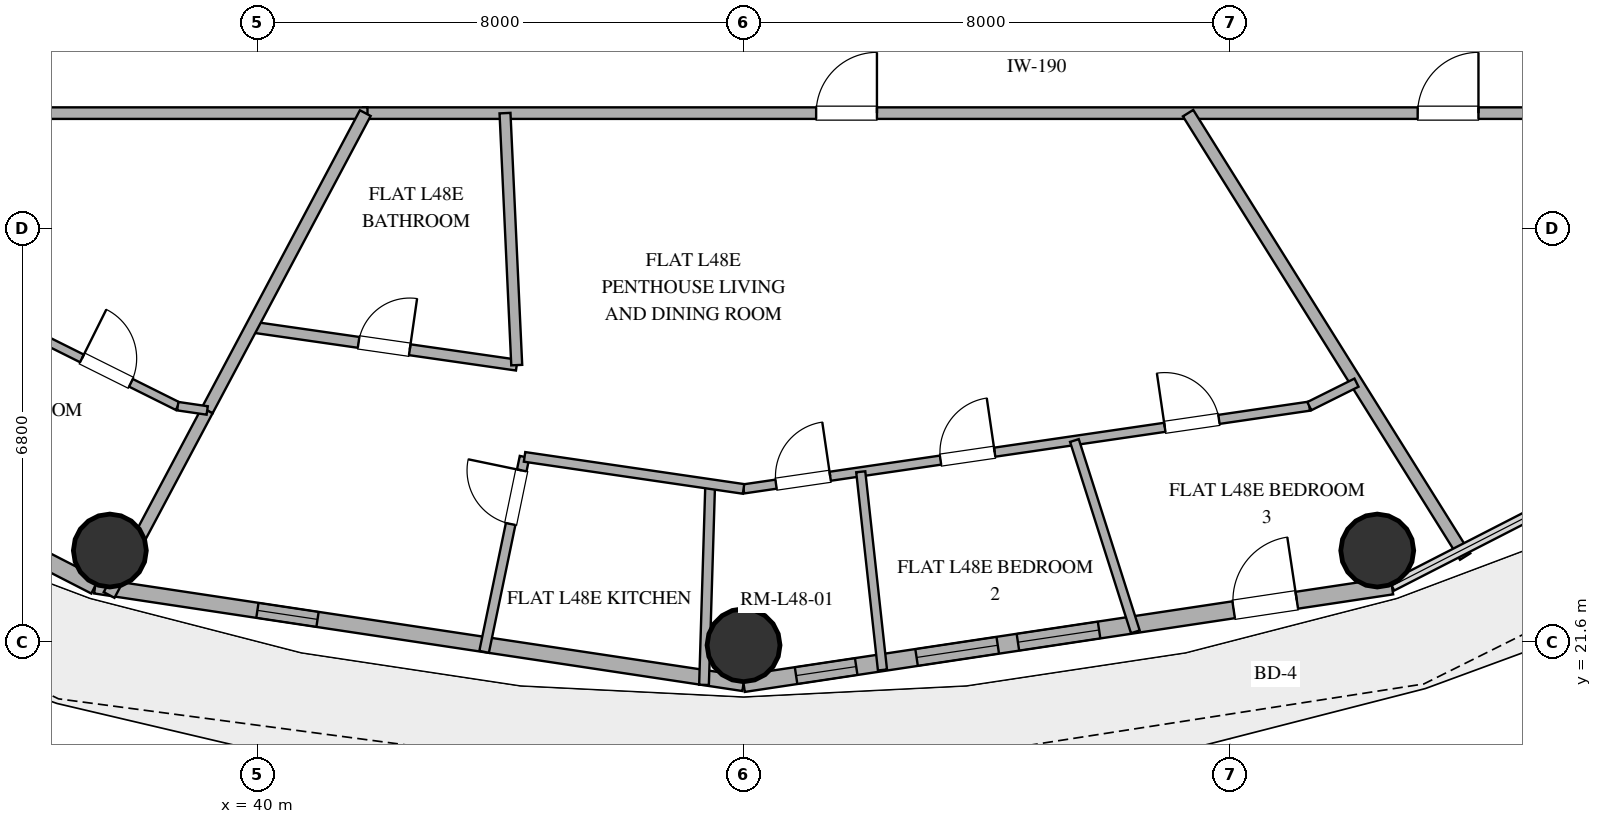
"""IFC4 building model, lengths in metres.
Left out: names, types, materials, properties, quantities, classifications, styles, units other than length and angle.
Written with IfcOpenShell. Run it as: python <this file> out.ifc"""

import sys

from ifc_helpers import new_model, si_unit, direction, frame, frame_2d, origin, origin_2d, place, context, subcontext, project, spatial, rectangle, hollow_circle, extrude, element, fill, save


model = new_model("IFC4")
c1 = context("Model", 3, precision=1e-05, world=origin(), true_north=direction((0.0, 1.0)))
c2 = subcontext(c1, "Body", "Model", "MODEL_VIEW")
j1 = project(units=[si_unit("LENGTHUNIT", "METRE"), si_unit("PLANEANGLEUNIT", "RADIAN")], contexts=[c1])
p1 = place(None, origin())
s1 = spatial("IfcSite", under=j1, at=p1, CompositionType="ELEMENT")
p2 = place(p1, origin())
s2 = spatial("IfcBuilding", under=s1, at=p2, CompositionType="ELEMENT")
p3 = place(p2, frame((0.0, 0.0, 190.2)))
s3 = spatial("IfcBuildingStorey", under=s2, at=p3, CompositionType="ELEMENT", Elevation=190.2)
for number, where, z_axis, x_axis in (
    (1, (37.578, 23.107, 0.0), (0.0, 0.0, 1.0), (1.0, 0.0, 0.0)),
    (2, (48.0, 21.55, 0.0), (0.0, 0.0, 1.0), (1.0, 0.0, 0.0)),
    (3, (58.422, 23.107, 0.0), (0.0, 0.0, 1.0), (1.0, 0.0, 0.0)),
):
    element("IfcColumn", number, at=place(p3, frame(where, z_axis=z_axis, x_axis=x_axis)), inside=s3, PredefinedType="COLUMN", context=c2, shape_type="SweptSolid", body=[
        extrude(hollow_circle(Radius=0.6, WallThickness=0.032, at=origin_2d()), origin(), (0.0, 0.0, 1.0), 3.38),
    ])
p4 = place(p3, frame((28.424, 27.094, 0.0), z_axis=(0.0, 0.0, 1.0), x_axis=(0.889872523182, -0.456209263919, 0.0)))
e4 = element("IfcWall", 4, at=p4, inside=s3, PredefinedType="SOLIDWALL", context=c2, shape_type="SweptSolid", body=[
    extrude(rectangle(XDim=10.016, YDim=0.28, at=frame_2d((5.008, 0.0))), origin(), (0.0, 0.0, 1.0), 3.38),
])
p5 = place(p4, frame((1.85, 0.0, 0.85)))
e5 = element("IfcOpeningElement", 5, at=p5, cuts=e4, PredefinedType="OPENING", context=c2, shape_type="SweptSolid", body=[
    extrude(rectangle(XDim=1.5, YDim=2.0, at=frame_2d((0.75, 1.0))), frame((0.0, 0.15, 0.0), z_axis=(0.0, -1.0, 0.0), x_axis=(1.0, 0.0, 0.0)), (0.0, 0.0, 1.0), 0.3),
])
p6 = place(p4, frame((4.595, 0.0, 0.85)))
e6 = element("IfcOpeningElement", 6, at=p6, cuts=e4, PredefinedType="OPENING", context=c2, shape_type="SweptSolid", body=[
    extrude(rectangle(XDim=1.5, YDim=1.8, at=frame_2d((0.75, 0.9))), frame((0.0, 0.15, 0.0), z_axis=(0.0, -1.0, 0.0), x_axis=(1.0, 0.0, 0.0)), (0.0, 0.0, 1.0), 0.3),
])
p7 = place(p4, frame((6.58, 0.0, 0.85)))
e7 = element("IfcOpeningElement", 7, at=p7, cuts=e4, PredefinedType="OPENING", context=c2, shape_type="SweptSolid", body=[
    extrude(rectangle(XDim=1.5, YDim=1.8, at=frame_2d((0.75, 0.9))), frame((0.0, 0.15, 0.0), z_axis=(0.0, -1.0, 0.0), x_axis=(1.0, 0.0, 0.0)), (0.0, 0.0, 1.0), 0.3),
])
p8 = place(p3, frame((37.337, 22.525, 0.0), z_axis=(0.0, 0.0, 1.0), x_axis=(0.988863993413, -0.148822049884, 0.0)))
e8 = element("IfcWall", 8, at=p8, inside=s3, PredefinedType="SOLIDWALL", context=c2, shape_type="SweptSolid", body=[
    extrude(rectangle(XDim=10.783, YDim=0.25, at=frame_2d((5.392, 0.0))), origin(), (0.0, 0.0, 1.0), 3.38),
])
p9 = place(p8, frame((2.698, 0.0, 1.42)))
e9 = element("IfcOpeningElement", 9, at=p9, cuts=e8, PredefinedType="OPENING", context=c2, shape_type="SweptSolid", body=[
    extrude(rectangle(XDim=1.0, YDim=1.05, at=frame_2d((0.5, 0.525))), frame((0.0, 0.135, 0.0), z_axis=(0.0, -1.0, 0.0), x_axis=(1.0, 0.0, 0.0)), (0.0, 0.0, 1.0), 0.27),
])
p10 = place(p3, frame((48.0, 20.92, 0.0), z_axis=(0.0, 0.0, 1.0), x_axis=(0.988863993413, 0.148822049884, 0.0)))
e10 = element("IfcWall", 10, at=p10, inside=s3, PredefinedType="SOLIDWALL", context=c2, shape_type="SweptSolid", body=[
    extrude(rectangle(XDim=10.783, YDim=0.28, at=frame_2d((5.392, 0.0))), origin(), (0.0, 0.0, 1.0), 3.38),
])
p11 = place(p10, frame((2.878, 0.0, 0.85)))
e11 = element("IfcOpeningElement", 11, at=p11, cuts=e10, PredefinedType="OPENING", context=c2, shape_type="SweptSolid", body=[
    extrude(rectangle(XDim=1.35, YDim=1.8, at=frame_2d((0.675, 0.9))), frame((0.0, 0.15, 0.0), z_axis=(0.0, -1.0, 0.0), x_axis=(1.0, 0.0, 0.0)), (0.0, 0.0, 1.0), 0.3),
])
p12 = place(p10, frame((4.563, 0.0, 0.85)))
e12 = element("IfcOpeningElement", 12, at=p12, cuts=e10, PredefinedType="OPENING", context=c2, shape_type="SweptSolid", body=[
    extrude(rectangle(XDim=1.35, YDim=1.8, at=frame_2d((0.675, 0.9))), frame((0.0, 0.15, 0.0), z_axis=(0.0, -1.0, 0.0), x_axis=(1.0, 0.0, 0.0)), (0.0, 0.0, 1.0), 0.3),
])
p13 = place(p10, frame((8.151, 0.0, 0.0)))
e13 = element("IfcOpeningElement", 13, at=p13, cuts=e10, PredefinedType="OPENING", context=c2, shape_type="SweptSolid", body=[
    extrude(rectangle(XDim=1.05, YDim=2.2, at=frame_2d((0.525, 1.1))), frame((0.0, 0.15, 0.0), z_axis=(0.0, -1.0, 0.0), x_axis=(1.0, 0.0, 0.0)), (0.0, 0.0, 1.0), 0.3),
])
p14 = place(p10, frame((0.874, 0.0, 0.85)))
e14 = element("IfcOpeningElement", 14, at=p14, cuts=e10, PredefinedType="OPENING", context=c2, shape_type="SweptSolid", body=[
    extrude(rectangle(XDim=1.0, YDim=1.8, at=frame_2d((0.5, 0.9))), frame((0.0, 0.15, 0.0), z_axis=(0.0, -1.0, 0.0), x_axis=(1.0, 0.0, 0.0)), (0.0, 0.0, 1.0), 0.3),
])
p15 = place(p3, frame((41.743, 30.3, 0.0), z_axis=(0.0, 0.0, 1.0), x_axis=(1.0, 0.0, 0.0)))
e15 = element("IfcWall", 15, at=p15, inside=s3, PredefinedType="PARTITIONING", context=c2, shape_type="SweptSolid", body=[
    extrude(rectangle(XDim=22.157, YDim=0.19, at=frame_2d((11.079, 0.0))), origin(), (0.0, 0.0, 1.0), 2.74),
])
p16 = place(p15, frame((7.451, 0.0, 0.0)))
e16 = element("IfcOpeningElement", 16, at=p16, cuts=e15, PredefinedType="OPENING", context=c2, shape_type="SweptSolid", body=[
    extrude(rectangle(XDim=1.0, YDim=2.2, at=frame_2d((0.5, 1.1))), frame((0.0, 0.105, 0.0), z_axis=(0.0, -1.0, 0.0), x_axis=(1.0, 0.0, 0.0)), (0.0, 0.0, 1.0), 0.21),
])
p17 = place(p15, frame((17.344, 0.0, 0.0)))
e17 = element("IfcOpeningElement", 17, at=p17, cuts=e15, PredefinedType="OPENING", context=c2, shape_type="SweptSolid", body=[
    extrude(rectangle(XDim=1.0, YDim=2.2, at=frame_2d((0.5, 1.1))), frame((0.0, 0.105, 0.0), z_axis=(0.0, -1.0, 0.0), x_axis=(1.0, 0.0, 0.0)), (0.0, 0.0, 1.0), 0.21),
])
p18 = place(p3, frame((41.815, 30.3, 0.0), z_axis=(0.0, 0.0, 1.0), x_axis=(-1.0, 0.0, 0.0)))
e18 = element("IfcWall", 18, at=p18, inside=s3, PredefinedType="PARTITIONING", context=c2, shape_type="SweptSolid", body=[
    extrude(rectangle(XDim=9.715, YDim=0.19, at=frame_2d((4.857, 0.0))), origin(), (0.0, 0.0, 1.0), 2.74),
])
p19 = place(p3, frame((59.868, 23.008, 0.0), z_axis=(0.0, 0.0, 1.0), x_axis=(-0.529914717401, 0.848050937315, 0.0)))
e19 = element("IfcWall", 19, at=p19, inside=s3, PredefinedType="PARTITIONING", context=c2, shape_type="SweptSolid", body=[
    extrude(rectangle(XDim=8.599, YDim=0.2, at=frame_2d((4.299, 0.0))), origin(), (0.0, 0.0, 1.0), 2.74),
])
p20 = place(p3, frame((39.909, 26.783, 0.0), z_axis=(0.0, 0.0, 1.0), x_axis=(0.989831677838, -0.142243627443, 0.0)))
e20 = element("IfcWall", 20, at=p20, inside=s3, PredefinedType="PLUMBINGWALL", context=c2, shape_type="SweptSolid", body=[
    extrude(rectangle(XDim=4.406, YDim=0.18, at=frame_2d((2.203, 0.0))), origin(), (0.0, 0.0, 1.0), 2.74),
])
p21 = place(p20, frame((1.778, 0.0, 0.0)))
e21 = element("IfcOpeningElement", 21, at=p21, cuts=e20, PredefinedType="OPENING", context=c2, shape_type="SweptSolid", body=[
    extrude(rectangle(XDim=0.85, YDim=2.1, at=frame_2d((0.425, 1.05))), frame((0.0, 0.1, 0.0), z_axis=(0.0, -1.0, 0.0), x_axis=(1.0, 0.0, 0.0)), (0.0, 0.0, 1.0), 0.2),
])
p22 = place(p3, frame((44.27, 26.156, 0.0), z_axis=(0.0, 0.0, 1.0), x_axis=(-0.046552902745, 0.998915825906, 0.0)))
e22 = element("IfcWall", 22, at=p22, inside=s3, PredefinedType="PLUMBINGWALL", context=c2, shape_type="SweptSolid", body=[
    extrude(rectangle(XDim=4.148, YDim=0.18, at=frame_2d((2.074, 0.0))), origin(), (0.0, 0.0, 1.0), 2.74),
])
p23 = place(p3, frame((39.179, 25.41, 0.0), z_axis=(0.0, 0.0, 1.0), x_axis=(0.469450659963, 0.88295870677, 0.0)))
e23 = element("IfcWall", 23, at=p23, inside=s3, PredefinedType="PARTITIONING", context=c2, shape_type="SweptSolid", body=[
    extrude(rectangle(XDim=5.538, YDim=0.2, at=frame_2d((2.769, 0.0))), origin(), (0.0, 0.0, 1.0), 2.74),
])
p24 = place(p3, frame((48.0, 24.12, 0.0), z_axis=(0.0, 0.0, 1.0), x_axis=(0.989474667704, 0.144706191892, 0.0)))
e24 = element("IfcWall", 24, at=p24, inside=s3, PredefinedType="PARTITIONING", context=c2, shape_type="SweptSolid", body=[
    extrude(rectangle(XDim=9.404, YDim=0.15, at=frame_2d((4.702, 0.0))), origin(), (0.0, 0.0, 1.0), 2.74),
])
p25 = place(p24, frame((7.002, 0.0, 0.0)))
e25 = element("IfcOpeningElement", 25, at=p25, cuts=e24, PredefinedType="OPENING", context=c2, shape_type="SweptSolid", body=[
    extrude(rectangle(XDim=0.9, YDim=2.1, at=frame_2d((0.45, 1.05))), frame((0.0, 0.085, 0.0), z_axis=(0.0, -1.0, 0.0), x_axis=(1.0, 0.0, 0.0)), (0.0, 0.0, 1.0), 0.17),
])
p26 = place(p24, frame((3.274, 0.0, 0.0)))
e26 = element("IfcOpeningElement", 26, at=p26, cuts=e24, PredefinedType="OPENING", context=c2, shape_type="SweptSolid", body=[
    extrude(rectangle(XDim=0.9, YDim=2.1, at=frame_2d((0.45, 1.05))), frame((0.0, 0.085, 0.0), z_axis=(0.0, -1.0, 0.0), x_axis=(1.0, 0.0, 0.0)), (0.0, 0.0, 1.0), 0.17),
])
p27 = place(p24, frame((0.54, 0.0, 0.0)))
e27 = element("IfcOpeningElement", 27, at=p27, cuts=e24, PredefinedType="OPENING", context=c2, shape_type="SweptSolid", body=[
    extrude(rectangle(XDim=0.9, YDim=2.1, at=frame_2d((0.45, 1.05))), frame((0.0, 0.085, 0.0), z_axis=(0.0, -1.0, 0.0), x_axis=(1.0, 0.0, 0.0)), (0.0, 0.0, 1.0), 0.17),
])
p28 = place(p3, frame((39.179, 25.41, 0.0), z_axis=(0.0, 0.0, 1.0), x_axis=(-0.469492799927, -0.882936300543, 0.0)))
e28 = element("IfcWall", 28, at=p28, inside=s3, PredefinedType="PARTITIONING", context=c2, shape_type="SweptSolid", body=[
    extrude(rectangle(XDim=3.437, YDim=0.2, at=frame_2d((1.718, 0.0))), origin(), (0.0, 0.0, 1.0), 2.74),
])
p29 = place(p3, frame((47.451, 24.2, 0.0), z_axis=(0.0, 0.0, 1.0), x_axis=(-0.03081032148, -0.999525249351, 0.0)))
e29 = element("IfcWall", 29, at=p29, inside=s3, PredefinedType="PLUMBINGWALL", context=c2, shape_type="SweptSolid", body=[
    extrude(rectangle(XDim=3.304, YDim=0.16, at=frame_2d((1.652, 0.0))), origin(), (0.0, 0.0, 1.0), 2.74),
])
p30 = place(p3, frame((53.442, 24.916, 0.0), z_axis=(0.0, 0.0, 1.0), x_axis=(0.303533258223, -0.952820844205, 0.0)))
e30 = element("IfcWall", 30, at=p30, inside=s3, PredefinedType="PARTITIONING", context=c2, shape_type="SweptSolid", body=[
    extrude(rectangle(XDim=3.302, YDim=0.15, at=frame_2d((1.651, 0.0))), origin(), (0.0, 0.0, 1.0), 2.74),
])
p31 = place(p3, frame((50.285, 21.143, 0.0), z_axis=(0.0, 0.0, 1.0), x_axis=(-0.108935832995, 0.994048783657, 0.0)))
e31 = element("IfcWall", 31, at=p31, inside=s3, PredefinedType="PARTITIONING", context=c2, shape_type="SweptSolid", body=[
    extrude(rectangle(XDim=3.279, YDim=0.15, at=frame_2d((1.639, 0.0))), origin(), (0.0, 0.0, 1.0), 2.74),
])
p32 = place(p3, frame((43.733, 21.441, 0.0), z_axis=(0.0, 0.0, 1.0), x_axis=(0.203194875639, 0.979138316334, 0.0)))
e32 = element("IfcWall", 32, at=p32, inside=s3, PredefinedType="PLUMBINGWALL", context=c2, shape_type="SweptSolid", body=[
    extrude(rectangle(XDim=3.274, YDim=0.16, at=frame_2d((1.637, 0.0))), origin(), (0.0, 0.0, 1.0), 2.74),
])
p33 = place(p32, frame((2.147, 0.0, 0.0)))
e33 = element("IfcOpeningElement", 33, at=p33, cuts=e32, PredefinedType="OPENING", context=c2, shape_type="SweptSolid", body=[
    extrude(rectangle(XDim=0.9, YDim=2.1, at=frame_2d((0.45, 1.05))), frame((0.0, 0.09, 0.0), z_axis=(0.0, -1.0, 0.0), x_axis=(1.0, 0.0, 0.0)), (0.0, 0.0, 1.0), 0.18),
])
p34 = place(p3, frame((44.398, 24.647, 0.0), z_axis=(0.0, 0.0, 1.0), x_axis=(0.989478635987, -0.144679054896, 0.0)))
e34 = element("IfcWall", 34, at=p34, inside=s3, PredefinedType="PLUMBINGWALL", context=c2, shape_type="SweptSolid", body=[
    extrude(rectangle(XDim=3.64, YDim=0.16, at=frame_2d((1.82, 0.0))), origin(), (0.0, 0.0, 1.0), 2.74),
])
p35 = place(p3, frame((36.349, 26.65, 0.0), z_axis=(0.0, 0.0, 1.0), x_axis=(0.895041110332, -0.445983644112, 0.0)))
e35 = element("IfcWall", 35, at=p35, inside=s3, PredefinedType="PARTITIONING", context=c2, shape_type="SweptSolid", body=[
    extrude(rectangle(XDim=2.621, YDim=0.14, at=frame_2d((1.311, 0.0))), origin(), (0.0, 0.0, 1.0), 2.74),
])
p36 = place(p35, frame((0.861, 0.0, 0.0)))
e36 = element("IfcOpeningElement", 36, at=p36, cuts=e35, PredefinedType="OPENING", context=c2, shape_type="SweptSolid", body=[
    extrude(rectangle(XDim=0.9, YDim=2.1, at=frame_2d((0.45, 1.05))), frame((0.0, 0.08, 0.0), z_axis=(0.0, -1.0, 0.0), x_axis=(1.0, 0.0, 0.0)), (0.0, 0.0, 1.0), 0.16),
])
p37 = place(p3, frame((57.305, 25.481, 0.0), z_axis=(0.0, 0.0, 1.0), x_axis=(0.895046131033, 0.445973567965, 0.0)))
e37 = element("IfcWall", 37, at=p37, inside=s3, PredefinedType="PARTITIONING", context=c2, shape_type="SweptSolid", body=[
    extrude(rectangle(XDim=0.867, YDim=0.15, at=frame_2d((0.433, 0.0))), origin(), (0.0, 0.0, 1.0), 2.74),
])
p38 = place(p3, frame((38.695, 25.481, 0.0), z_axis=(0.0, 0.0, 1.0), x_axis=(0.989485449351, -0.144632449754, 0.0)))
e38 = element("IfcWall", 38, at=p38, inside=s3, PredefinedType="PARTITIONING", context=c2, shape_type="SweptSolid", body=[
    extrude(rectangle(XDim=0.49, YDim=0.14, at=frame_2d((0.245, 0.0))), origin(), (0.0, 0.0, 1.0), 2.74),
])
p39 = place(p11, origin())
e39 = element("IfcWindow", 39, at=p39, inside=s3, PartitioningType="SINGLE_PANEL", PredefinedType="WINDOW", context=c2, shape_type="SweptSolid", body=[
    extrude(rectangle(XDim=1.35, YDim=1.8, at=frame_2d((0.675, 0.9))), frame((0.0, 0.03, 0.0), z_axis=(0.0, -1.0, 0.0), x_axis=(1.0, 0.0, 0.0)), (0.0, 0.0, 1.0), 0.06),
])
fill(e11, e39)
p40 = place(p12, origin())
e40 = element("IfcWindow", 40, at=p40, inside=s3, PartitioningType="SINGLE_PANEL", PredefinedType="WINDOW", context=c2, shape_type="SweptSolid", body=[
    extrude(rectangle(XDim=1.35, YDim=1.8, at=frame_2d((0.675, 0.9))), frame((0.0, 0.03, 0.0), z_axis=(0.0, -1.0, 0.0), x_axis=(1.0, 0.0, 0.0)), (0.0, 0.0, 1.0), 0.06),
])
fill(e12, e40)
p41 = place(p13, origin())
e41 = element("IfcDoor", 41, at=p41, inside=s3, OperationType="SINGLE_SWING_RIGHT", PredefinedType="DOOR", context=c2, shape_type="SweptSolid", body=[
    extrude(rectangle(XDim=1.05, YDim=2.2, at=frame_2d((0.525, 1.1))), frame((0.0, 0.025, 0.0), z_axis=(0.0, -1.0, 0.0), x_axis=(1.0, 0.0, 0.0)), (0.0, 0.0, 1.0), 0.05),
])
fill(e13, e41)
p42 = place(p9, origin())
e42 = element("IfcWindow", 42, at=p42, inside=s3, PartitioningType="SINGLE_PANEL", PredefinedType="WINDOW", context=c2, shape_type="SweptSolid", body=[
    extrude(rectangle(XDim=1.0, YDim=1.05, at=frame_2d((0.5, 0.525))), frame((0.0, 0.03, 0.0), z_axis=(0.0, -1.0, 0.0), x_axis=(1.0, 0.0, 0.0)), (0.0, 0.0, 1.0), 0.06),
])
fill(e9, e42)
p43 = place(p14, origin())
e43 = element("IfcWindow", 43, at=p43, inside=s3, PartitioningType="SINGLE_PANEL", PredefinedType="WINDOW", context=c2, shape_type="SweptSolid", body=[
    extrude(rectangle(XDim=1.0, YDim=1.8, at=frame_2d((0.5, 0.9))), frame((0.0, 0.03, 0.0), z_axis=(0.0, -1.0, 0.0), x_axis=(1.0, 0.0, 0.0)), (0.0, 0.0, 1.0), 0.06),
])
fill(e14, e43)
p44 = place(p16, origin())
e44 = element("IfcDoor", 44, at=p44, inside=s3, OperationType="SINGLE_SWING_RIGHT", PredefinedType="DOOR", context=c2, shape_type="SweptSolid", body=[
    extrude(rectangle(XDim=1.0, YDim=2.2, at=frame_2d((0.5, 1.1))), frame((0.0, 0.025, 0.0), z_axis=(0.0, -1.0, 0.0), x_axis=(1.0, 0.0, 0.0)), (0.0, 0.0, 1.0), 0.05),
])
fill(e16, e44)
p45 = place(p17, origin())
e45 = element("IfcDoor", 45, at=p45, inside=s3, OperationType="SINGLE_SWING_RIGHT", PredefinedType="DOOR", context=c2, shape_type="SweptSolid", body=[
    extrude(rectangle(XDim=1.0, YDim=2.2, at=frame_2d((0.5, 1.1))), frame((0.0, 0.025, 0.0), z_axis=(0.0, -1.0, 0.0), x_axis=(1.0, 0.0, 0.0)), (0.0, 0.0, 1.0), 0.05),
])
fill(e17, e45)
p46 = place(p21, origin())
e46 = element("IfcDoor", 46, at=p46, inside=s3, OperationType="SINGLE_SWING_RIGHT", PredefinedType="DOOR", context=c2, shape_type="SweptSolid", body=[
    extrude(rectangle(XDim=0.85, YDim=2.1, at=frame_2d((0.425, 1.05))), frame((0.0, 0.025, 0.0), z_axis=(0.0, -1.0, 0.0), x_axis=(1.0, 0.0, 0.0)), (0.0, 0.0, 1.0), 0.05),
])
fill(e21, e46)
p47 = place(p25, origin())
e47 = element("IfcDoor", 47, at=p47, inside=s3, OperationType="SINGLE_SWING_LEFT", PredefinedType="DOOR", context=c2, shape_type="SweptSolid", body=[
    extrude(rectangle(XDim=0.9, YDim=2.1, at=frame_2d((0.45, 1.05))), frame((0.0, 0.025, 0.0), z_axis=(0.0, -1.0, 0.0), x_axis=(1.0, 0.0, 0.0)), (0.0, 0.0, 1.0), 0.05),
])
fill(e25, e47)
p48 = place(p26, origin())
e48 = element("IfcDoor", 48, at=p48, inside=s3, OperationType="SINGLE_SWING_RIGHT", PredefinedType="DOOR", context=c2, shape_type="SweptSolid", body=[
    extrude(rectangle(XDim=0.9, YDim=2.1, at=frame_2d((0.45, 1.05))), frame((0.0, 0.025, 0.0), z_axis=(0.0, -1.0, 0.0), x_axis=(1.0, 0.0, 0.0)), (0.0, 0.0, 1.0), 0.05),
])
fill(e26, e48)
p49 = place(p27, origin())
e49 = element("IfcDoor", 49, at=p49, inside=s3, OperationType="SINGLE_SWING_RIGHT", PredefinedType="DOOR", context=c2, shape_type="SweptSolid", body=[
    extrude(rectangle(XDim=0.9, YDim=2.1, at=frame_2d((0.45, 1.05))), frame((0.0, 0.025, 0.0), z_axis=(0.0, -1.0, 0.0), x_axis=(1.0, 0.0, 0.0)), (0.0, 0.0, 1.0), 0.05),
])
fill(e27, e49)
p50 = place(p33, origin())
e50 = element("IfcDoor", 50, at=p50, inside=s3, OperationType="SINGLE_SWING_RIGHT", PredefinedType="DOOR", context=c2, shape_type="SweptSolid", body=[
    extrude(rectangle(XDim=0.9, YDim=2.1, at=frame_2d((0.45, 1.05))), frame((0.0, 0.025, 0.0), z_axis=(0.0, -1.0, 0.0), x_axis=(1.0, 0.0, 0.0)), (0.0, 0.0, 1.0), 0.05),
])
fill(e33, e50)
p51 = place(p36, origin())
e51 = element("IfcDoor", 51, at=p51, inside=s3, OperationType="SINGLE_SWING_LEFT", PredefinedType="DOOR", context=c2, shape_type="SweptSolid", body=[
    extrude(rectangle(XDim=0.9, YDim=2.1, at=frame_2d((0.45, 1.05))), frame((0.0, 0.025, 0.0), z_axis=(0.0, -1.0, 0.0), x_axis=(1.0, 0.0, 0.0)), (0.0, 0.0, 1.0), 0.05),
])
fill(e36, e51)
save(model, sys.argv[1])
